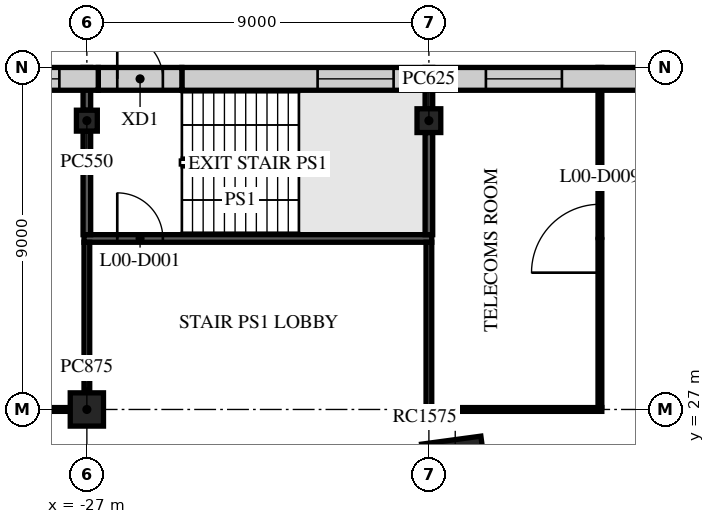
"""IFC4 building model, lengths in metres.
Left out: names, types, materials, properties, quantities, classifications, styles, units other than length and angle.
Written with IfcOpenShell. Run it as: python <this file> out.ifc"""

import sys

from ifc_helpers import new_model, si_unit, direction, frame, frame_2d, origin, origin_2d, place, context, subcontext, project, spatial, rectangle, extrude, element, fill, save


model = new_model("IFC4")
c1 = context("Model", 3, precision=1e-05, world=origin(), true_north=direction((0.0, 1.0)))
c2 = subcontext(c1, "Body", "Model", "MODEL_VIEW")
j1 = project(units=[si_unit("LENGTHUNIT", "METRE"), si_unit("PLANEANGLEUNIT", "RADIAN")], contexts=[c1])
p1 = place(None, origin())
s1 = spatial("IfcSite", under=j1, at=p1, CompositionType="ELEMENT")
p2 = place(p1, origin())
s2 = spatial("IfcBuilding", under=s1, at=p2, CompositionType="ELEMENT")
p3 = place(p2, origin())
s3 = spatial("IfcBuildingStorey", under=s2, at=p3, CompositionType="ELEMENT", Elevation=0.0)
p4 = place(p3, frame((-27.0, 27.0, 0.0), z_axis=(0.0, 0.0, 1.0), x_axis=(1.0, 0.0, 0.0)))
e1 = element("IfcColumn", 1, at=p4, inside=s3, PredefinedType="COLUMN", context=c2, shape_type="SweptSolid", body=[
    extrude(rectangle(XDim=0.875, YDim=0.875, at=origin_2d()), origin(), (0.0, 0.0, 1.0), 4.5),
])
p5 = place(p3, frame((-27.0, 34.6, 0.0), z_axis=(0.0, 0.0, 1.0), x_axis=(1.0, 0.0, 0.0)))
e2 = element("IfcColumn", 2, at=p5, inside=s3, PredefinedType="COLUMN", context=c2, shape_type="SweptSolid", body=[
    extrude(rectangle(XDim=0.55, YDim=0.55, at=origin_2d()), origin(), (0.0, 0.0, 1.0), 4.5),
])
p6 = place(p3, frame((-18.0, 34.6, 0.0), z_axis=(0.0, 0.0, 1.0), x_axis=(1.0, 0.0, 0.0)))
e3 = element("IfcColumn", 3, at=p6, inside=s3, PredefinedType="COLUMN", context=c2, shape_type="SweptSolid", body=[
    extrude(rectangle(XDim=0.625, YDim=0.625, at=origin_2d()), origin(), (0.0, 0.0, 1.0), 4.5),
])
p7 = place(p3, frame((-17.307, 25.412, 0.0), z_axis=(0.0, 0.0, 1.0), x_axis=(0.991001197216, 0.133853005627, 0.0)))
e4 = element("IfcColumn", 4, at=p7, inside=s3, PredefinedType="COLUMN", context=c2, shape_type="SweptSolid", body=[
    extrude(rectangle(XDim=1.575, YDim=1.575, at=origin_2d()), origin(), (0.0, 0.0, 1.0), 4.5),
])
p8 = place(p3, frame((-34.1, 27.0, 0.0), z_axis=(0.0, 0.0, 1.0), x_axis=(1.0, 0.0, 0.0)))
e5 = element("IfcWall", 5, at=p8, inside=s3, PredefinedType="PARTITIONING", context=c2, shape_type="SweptSolid", body=[
    extrude(rectangle(XDim=6.6, YDim=0.1, at=frame_2d((3.3, 0.0))), origin(), (0.0, 0.0, 1.0), 4.1),
])
p9 = place(p8, frame((1.7, 0.0, 0.0)))
e6 = element("IfcOpeningElement", 6, at=p9, cuts=e5, PredefinedType="OPENING", context=c2, shape_type="SweptSolid", body=[
    extrude(rectangle(XDim=1.8, YDim=2.1, at=frame_2d((0.9, 1.05))), frame((0.0, 0.06, 0.0), z_axis=(0.0, -1.0, 0.0), x_axis=(1.0, 0.0, 0.0)), (0.0, 0.0, 1.0), 0.12),
])
p10 = place(p3, frame((-18.075, 27.0, 0.0), z_axis=(0.0, 0.0, 1.0), x_axis=(1.0, 0.0, 0.0)))
e7 = element("IfcWall", 7, at=p10, inside=s3, PredefinedType="PARTITIONING", context=c2, shape_type="SweptSolid", body=[
    extrude(rectangle(XDim=4.625, YDim=0.1, at=frame_2d((2.312, 0.0))), origin(), (0.0, 0.0, 1.0), 4.1),
])
p11 = place(p3, frame((-27.075, 31.5, 0.0), z_axis=(0.0, 0.0, 1.0), x_axis=(1.0, 0.0, 0.0)))
e8 = element("IfcWall", 8, at=p11, inside=s3, PredefinedType="PARTITIONING", context=c2, shape_type="SweptSolid", body=[
    extrude(rectangle(XDim=9.15, YDim=0.2, at=frame_2d((4.575, 0.0))), origin(), (0.0, 0.0, 1.0), 4.1),
])
p12 = place(p11, frame((0.875, 0.0, 0.0)))
e9 = element("IfcOpeningElement", 9, at=p12, cuts=e8, PredefinedType="OPENING", context=c2, shape_type="SweptSolid", body=[
    extrude(rectangle(XDim=1.2, YDim=2.1, at=frame_2d((0.6, 1.05))), frame((0.0, 0.11, 0.0), z_axis=(0.0, -1.0, 0.0), x_axis=(1.0, 0.0, 0.0)), (0.0, 0.0, 1.0), 0.22),
])
p13 = place(p3, frame((-27.0, 27.5, 0.0), z_axis=(0.0, 0.0, 1.0), x_axis=(0.0, 1.0, 0.0)))
e10 = element("IfcWall", 10, at=p13, inside=s3, PredefinedType="PARTITIONING", context=c2, shape_type="SweptSolid", body=[
    extrude(rectangle(XDim=3.9, YDim=0.15, at=frame_2d((1.95, 0.0))), origin(), (0.0, 0.0, 1.0), 4.1),
])
p14 = place(p3, frame((-27.0, 31.6, 0.0), z_axis=(0.0, 0.0, 1.0), x_axis=(0.0, 1.0, 0.0)))
e11 = element("IfcWall", 11, at=p14, inside=s3, PredefinedType="PARTITIONING", context=c2, shape_type="SweptSolid", body=[
    extrude(rectangle(XDim=2.725, YDim=0.2, at=frame_2d((1.362, 0.0))), origin(), (0.0, 0.0, 1.0), 4.1),
])
p15 = place(p3, frame((-27.0, 34.875, 0.0), z_axis=(0.0, 0.0, 1.0), x_axis=(0.0, 1.0, 0.0)))
e12 = element("IfcWall", 12, at=p15, inside=s3, PredefinedType="PARTITIONING", context=c2, shape_type="SweptSolid", body=[
    extrude(rectangle(XDim=1.125, YDim=0.2, at=frame_2d((0.562, 0.0))), origin(), (0.0, 0.0, 1.0), 4.1),
])
p16 = place(p3, frame((-18.0, 27.05, 0.0), z_axis=(0.0, 0.0, 1.0), x_axis=(0.0, 1.0, 0.0)))
e13 = element("IfcWall", 13, at=p16, inside=s3, PredefinedType="PARTITIONING", context=c2, shape_type="SweptSolid", body=[
    extrude(rectangle(XDim=4.35, YDim=0.15, at=frame_2d((2.175, 0.0))), origin(), (0.0, 0.0, 1.0), 4.1),
])
p17 = place(p3, frame((-18.0, 31.6, 0.0), z_axis=(0.0, 0.0, 1.0), x_axis=(0.0, 1.0, 0.0)))
e14 = element("IfcWall", 14, at=p17, inside=s3, PredefinedType="PARTITIONING", context=c2, shape_type="SweptSolid", body=[
    extrude(rectangle(XDim=2.688, YDim=0.2, at=frame_2d((1.344, 0.0))), origin(), (0.0, 0.0, 1.0), 4.1),
])
p18 = place(p3, frame((-18.0, 34.913, 0.0), z_axis=(0.0, 0.0, 1.0), x_axis=(0.0, 1.0, 0.0)))
e15 = element("IfcWall", 15, at=p18, inside=s3, PredefinedType="PARTITIONING", context=c2, shape_type="SweptSolid", body=[
    extrude(rectangle(XDim=1.087, YDim=0.2, at=frame_2d((0.544, 0.0))), origin(), (0.0, 0.0, 1.0), 4.1),
])
p19 = place(p3, frame((-13.5, 27.05, 0.0), z_axis=(0.0, 0.0, 1.0), x_axis=(0.0, 1.0, 0.0)))
e16 = element("IfcWall", 16, at=p19, inside=s3, PredefinedType="PARTITIONING", context=c2, shape_type="SweptSolid", body=[
    extrude(rectangle(XDim=8.95, YDim=0.1, at=frame_2d((4.475, 0.0))), origin(), (0.0, 0.0, 1.0), 4.1),
])
p20 = place(p19, frame((3.55, 0.0, 0.0)))
e17 = element("IfcOpeningElement", 17, at=p20, cuts=e16, PredefinedType="OPENING", context=c2, shape_type="SweptSolid", body=[
    extrude(rectangle(XDim=1.8, YDim=2.1, at=frame_2d((0.9, 1.05))), frame((0.0, 0.06, 0.0), z_axis=(0.0, -1.0, 0.0), x_axis=(1.0, 0.0, 0.0)), (0.0, 0.0, 1.0), 0.12),
])
p21 = place(p3, frame((24.5, 35.7, 0.0), z_axis=(0.0, 0.0, 1.0), x_axis=(-1.0, 0.0, 0.0)))
e18 = element("IfcWall", 18, at=p21, inside=s3, PredefinedType="STANDARD", context=c2, shape_type="SweptSolid", body=[
    extrude(rectangle(XDim=49.0, YDim=0.6, at=frame_2d((24.5, 0.0))), origin(), (0.0, 0.0, 1.0), 4.1),
])
p22 = place(p21, frame((3.571, 0.0, 0.45)))
e19 = element("IfcOpeningElement", 19, at=p22, cuts=e18, PredefinedType="OPENING", context=c2, shape_type="SweptSolid", body=[
    extrude(rectangle(XDim=2.0, YDim=3.2, at=frame_2d((1.0, 1.6))), frame((0.0, 0.31, 0.0), z_axis=(0.0, -1.0, 0.0), x_axis=(1.0, 0.0, 0.0)), (0.0, 0.0, 1.0), 0.62),
])
p23 = place(p21, frame((8.0, 0.0, 0.45)))
e20 = element("IfcOpeningElement", 20, at=p23, cuts=e18, PredefinedType="OPENING", context=c2, shape_type="SweptSolid", body=[
    extrude(rectangle(XDim=2.0, YDim=3.2, at=frame_2d((1.0, 1.6))), frame((0.0, 0.31, 0.0), z_axis=(0.0, -1.0, 0.0), x_axis=(1.0, 0.0, 0.0)), (0.0, 0.0, 1.0), 0.62),
])
p24 = place(p21, frame((12.429, 0.0, 0.45)))
e21 = element("IfcOpeningElement", 21, at=p24, cuts=e18, PredefinedType="OPENING", context=c2, shape_type="SweptSolid", body=[
    extrude(rectangle(XDim=2.0, YDim=3.2, at=frame_2d((1.0, 1.6))), frame((0.0, 0.31, 0.0), z_axis=(0.0, -1.0, 0.0), x_axis=(1.0, 0.0, 0.0)), (0.0, 0.0, 1.0), 0.62),
])
p25 = place(p21, frame((16.857, 0.0, 0.45)))
e22 = element("IfcOpeningElement", 22, at=p25, cuts=e18, PredefinedType="OPENING", context=c2, shape_type="SweptSolid", body=[
    extrude(rectangle(XDim=2.0, YDim=3.2, at=frame_2d((1.0, 1.6))), frame((0.0, 0.31, 0.0), z_axis=(0.0, -1.0, 0.0), x_axis=(1.0, 0.0, 0.0)), (0.0, 0.0, 1.0), 0.62),
])
p26 = place(p21, frame((21.286, 0.0, 0.45)))
e23 = element("IfcOpeningElement", 23, at=p26, cuts=e18, PredefinedType="OPENING", context=c2, shape_type="SweptSolid", body=[
    extrude(rectangle(XDim=2.0, YDim=3.2, at=frame_2d((1.0, 1.6))), frame((0.0, 0.31, 0.0), z_axis=(0.0, -1.0, 0.0), x_axis=(1.0, 0.0, 0.0)), (0.0, 0.0, 1.0), 0.62),
])
p27 = place(p21, frame((25.714, 0.0, 0.45)))
e24 = element("IfcOpeningElement", 24, at=p27, cuts=e18, PredefinedType="OPENING", context=c2, shape_type="SweptSolid", body=[
    extrude(rectangle(XDim=2.0, YDim=3.2, at=frame_2d((1.0, 1.6))), frame((0.0, 0.31, 0.0), z_axis=(0.0, -1.0, 0.0), x_axis=(1.0, 0.0, 0.0)), (0.0, 0.0, 1.0), 0.62),
])
p28 = place(p21, frame((30.143, 0.0, 0.45)))
e25 = element("IfcOpeningElement", 25, at=p28, cuts=e18, PredefinedType="OPENING", context=c2, shape_type="SweptSolid", body=[
    extrude(rectangle(XDim=2.0, YDim=3.2, at=frame_2d((1.0, 1.6))), frame((0.0, 0.31, 0.0), z_axis=(0.0, -1.0, 0.0), x_axis=(1.0, 0.0, 0.0)), (0.0, 0.0, 1.0), 0.62),
])
p29 = place(p21, frame((34.571, 0.0, 0.45)))
e26 = element("IfcOpeningElement", 26, at=p29, cuts=e18, PredefinedType="OPENING", context=c2, shape_type="SweptSolid", body=[
    extrude(rectangle(XDim=2.0, YDim=3.2, at=frame_2d((1.0, 1.6))), frame((0.0, 0.31, 0.0), z_axis=(0.0, -1.0, 0.0), x_axis=(1.0, 0.0, 0.0)), (0.0, 0.0, 1.0), 0.62),
])
p30 = place(p21, frame((39.0, 0.0, 0.45)))
e27 = element("IfcOpeningElement", 27, at=p30, cuts=e18, PredefinedType="OPENING", context=c2, shape_type="SweptSolid", body=[
    extrude(rectangle(XDim=2.0, YDim=3.2, at=frame_2d((1.0, 1.6))), frame((0.0, 0.31, 0.0), z_axis=(0.0, -1.0, 0.0), x_axis=(1.0, 0.0, 0.0)), (0.0, 0.0, 1.0), 0.62),
])
p31 = place(p21, frame((43.429, 0.0, 0.45)))
e28 = element("IfcOpeningElement", 28, at=p31, cuts=e18, PredefinedType="OPENING", context=c2, shape_type="SweptSolid", body=[
    extrude(rectangle(XDim=2.0, YDim=3.2, at=frame_2d((1.0, 1.6))), frame((0.0, 0.31, 0.0), z_axis=(0.0, -1.0, 0.0), x_axis=(1.0, 0.0, 0.0)), (0.0, 0.0, 1.0), 0.62),
])
p32 = place(p3, frame((-26.7, 35.7, 0.0), z_axis=(0.0, 0.0, 1.0), x_axis=(1.0, 0.0, 0.0)))
e29 = element("IfcWall", 29, at=p32, inside=s3, PredefinedType="STANDARD", context=c2, shape_type="SweptSolid", body=[
    extrude(rectangle(XDim=2.2, YDim=0.6, at=frame_2d((1.1, 0.0))), origin(), (0.0, 0.0, 1.0), 4.1),
])
p33 = place(p32, frame((0.5, 0.0, 0.0)))
e30 = element("IfcOpeningElement", 30, at=p33, cuts=e29, PredefinedType="OPENING", context=c2, shape_type="SweptSolid", body=[
    extrude(rectangle(XDim=1.2, YDim=2.4, at=frame_2d((0.6, 1.2))), frame((0.0, 0.31, 0.0), z_axis=(0.0, -1.0, 0.0), x_axis=(1.0, 0.0, 0.0)), (0.0, 0.0, 1.0), 0.62),
])
p34 = place(p3, frame((-26.7, 35.7, 0.0), z_axis=(0.0, 0.0, 1.0), x_axis=(-1.0, 0.0, 0.0)))
e31 = element("IfcWall", 31, at=p34, inside=s3, PredefinedType="STANDARD", context=c2, shape_type="SweptSolid", body=[
    extrude(rectangle(XDim=4.176, YDim=0.6, at=frame_2d((2.088, 0.0))), origin(), (0.0, 0.0, 1.0), 4.1),
])
p35 = place(p34, frame((1.024, 0.0, 0.45)))
e32 = element("IfcOpeningElement", 32, at=p35, cuts=e31, PredefinedType="OPENING", context=c2, shape_type="SweptSolid", body=[
    extrude(rectangle(XDim=2.0, YDim=3.2, at=frame_2d((1.0, 1.6))), frame((0.0, 0.31, 0.0), z_axis=(0.0, -1.0, 0.0), x_axis=(1.0, 0.0, 0.0)), (0.0, 0.0, 1.0), 0.62),
])
p36 = place(p12, frame((1.2, 0.0, 0.0), z_axis=(0.0, 0.0, 1.0), x_axis=(-1.0, 0.0, 0.0)))
e33 = element("IfcDoor", 33, at=p36, inside=s3, OperationType="SINGLE_SWING_LEFT", PredefinedType="DOOR", context=c2, shape_type="SweptSolid", body=[
    extrude(rectangle(XDim=1.2, YDim=2.1, at=frame_2d((0.6, 1.05))), frame((0.0, 0.025, 0.0), z_axis=(0.0, -1.0, 0.0), x_axis=(1.0, 0.0, 0.0)), (0.0, 0.0, 1.0), 0.05),
])
fill(e9, e33)
p37 = place(p20, origin())
e34 = element("IfcDoor", 34, at=p37, inside=s3, OperationType="DOUBLE_DOOR_SINGLE_SWING", PredefinedType="DOOR", context=c2, shape_type="SweptSolid", body=[
    extrude(rectangle(XDim=1.8, YDim=2.1, at=frame_2d((0.9, 1.05))), frame((0.0, 0.025, 0.0), z_axis=(0.0, -1.0, 0.0), x_axis=(1.0, 0.0, 0.0)), (0.0, 0.0, 1.0), 0.05),
])
fill(e17, e34)
p38 = place(p30, origin())
e35 = element("IfcWindow", 35, at=p38, inside=s3, PartitioningType="SINGLE_PANEL", PredefinedType="WINDOW", context=c2, shape_type="SweptSolid", body=[
    extrude(rectangle(XDim=2.0, YDim=3.2, at=frame_2d((1.0, 1.6))), frame((0.0, 0.03, 0.0), z_axis=(0.0, -1.0, 0.0), x_axis=(1.0, 0.0, 0.0)), (0.0, 0.0, 1.0), 0.06),
])
fill(e27, e35)
p39 = place(p31, origin())
e36 = element("IfcWindow", 36, at=p39, inside=s3, PartitioningType="SINGLE_PANEL", PredefinedType="WINDOW", context=c2, shape_type="SweptSolid", body=[
    extrude(rectangle(XDim=2.0, YDim=3.2, at=frame_2d((1.0, 1.6))), frame((0.0, 0.03, 0.0), z_axis=(0.0, -1.0, 0.0), x_axis=(1.0, 0.0, 0.0)), (0.0, 0.0, 1.0), 0.06),
])
fill(e28, e36)
p40 = place(p33, origin())
e37 = element("IfcDoor", 37, at=p40, inside=s3, OperationType="SINGLE_SWING_LEFT", PredefinedType="DOOR", context=c2, shape_type="SweptSolid", body=[
    extrude(rectangle(XDim=1.2, YDim=2.4, at=frame_2d((0.6, 1.2))), frame((0.0, 0.025, 0.0), z_axis=(0.0, -1.0, 0.0), x_axis=(1.0, 0.0, 0.0)), (0.0, 0.0, 1.0), 0.05),
])
fill(e30, e37)
p41 = place(p35, origin())
e38 = element("IfcWindow", 38, at=p41, inside=s3, PartitioningType="SINGLE_PANEL", PredefinedType="WINDOW", context=c2, shape_type="SweptSolid", body=[
    extrude(rectangle(XDim=2.0, YDim=3.2, at=frame_2d((1.0, 1.6))), frame((0.0, 0.03, 0.0), z_axis=(0.0, -1.0, 0.0), x_axis=(1.0, 0.0, 0.0)), (0.0, 0.0, 1.0), 0.06),
])
fill(e32, e38)
save(model, sys.argv[1])
